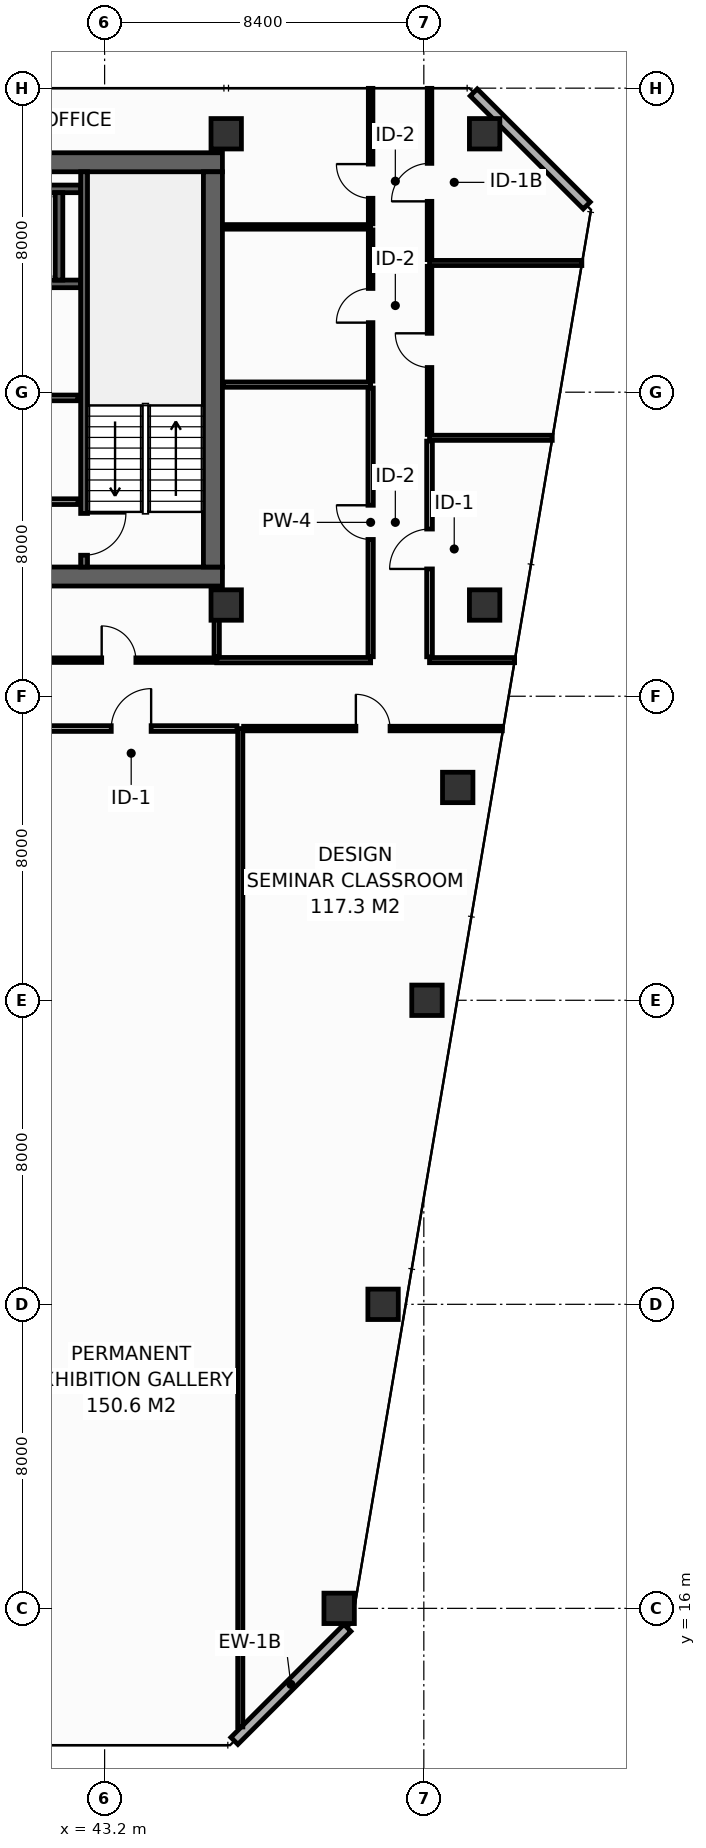
"""IFC4 building model, lengths in metres.
Left out: names, types, materials, properties, quantities, classifications, styles, units other than length and angle.
Written with IfcOpenShell. Run it as: python <this file> out.ifc"""

import sys

from ifc_helpers import new_model, si_unit, direction, frame, frame_2d, origin, origin_2d, place, context, subcontext, project, spatial, rectangle, hollow_rectangle, extrude, element, fill, save


model = new_model("IFC4")
c1 = context("Model", 3, precision=1e-05, world=origin(), true_north=direction((0.0, 1.0)))
c2 = subcontext(c1, "Body", "Model", "MODEL_VIEW")
j1 = project(units=[si_unit("LENGTHUNIT", "METRE"), si_unit("PLANEANGLEUNIT", "RADIAN")], contexts=[c1])
p1 = place(None, origin())
s1 = spatial("IfcSite", under=j1, at=p1, CompositionType="ELEMENT")
p2 = place(p1, origin())
s2 = spatial("IfcBuilding", under=s1, at=p2, CompositionType="ELEMENT")
p3 = place(p2, frame((0.0, 0.0, 186.6)))
s3 = spatial("IfcBuildingStorey", under=s2, at=p3, CompositionType="ELEMENT", Elevation=186.6)
p4 = place(p3, frame((13.6, 43.15, 0.0), z_axis=(0.0, 0.0, 1.0), x_axis=(1.0, 0.0, 0.0)))
e1 = element("IfcWall", 1, at=p4, inside=s3, PredefinedType="SHEAR", context=c2, shape_type="SweptSolid", body=[
    extrude(rectangle(XDim=32.7, YDim=0.5, at=frame_2d((16.35, 0.0))), origin(), (0.0, 0.0, 1.0), 3.55),
])
p5 = place(p4, frame((5.4, 0.0, 0.0)))
e2 = element("IfcOpeningElement", 2, at=p5, cuts=e1, PredefinedType="OPENING", context=c2, shape_type="SweptSolid", body=[
    extrude(rectangle(XDim=1.1, YDim=2.15, at=frame_2d((0.55, 1.075))), frame((0.0, 0.26, 0.0), z_axis=(0.0, -1.0, 0.0), x_axis=(1.0, 0.0, 0.0)), (0.0, 0.0, 1.0), 0.52),
])
p6 = place(p4, frame((25.6, 0.0, 0.0)))
e3 = element("IfcOpeningElement", 3, at=p6, cuts=e1, PredefinedType="OPENING", context=c2, shape_type="SweptSolid", body=[
    extrude(rectangle(XDim=1.1, YDim=2.15, at=frame_2d((0.55, 1.075))), frame((0.0, 0.26, 0.0), z_axis=(0.0, -1.0, 0.0), x_axis=(1.0, 0.0, 0.0)), (0.0, 0.0, 1.0), 0.52),
])
p7 = place(p3, frame((13.6, 54.05, 0.0), z_axis=(0.0, 0.0, 1.0), x_axis=(1.0, 0.0, 0.0)))
e4 = element("IfcWall", 4, at=p7, inside=s3, PredefinedType="SHEAR", context=c2, shape_type="SweptSolid", body=[
    extrude(rectangle(XDim=32.7, YDim=0.5, at=frame_2d((16.35, 0.0))), origin(), (0.0, 0.0, 1.0), 3.55),
])
p8 = place(p3, frame((46.05, 43.4, 0.0), z_axis=(0.0, 0.0, 1.0), x_axis=(0.0, 1.0, 0.0)))
e5 = element("IfcWall", 5, at=p8, inside=s3, PredefinedType="SHEAR", context=c2, shape_type="SweptSolid", body=[
    extrude(rectangle(XDim=10.4, YDim=0.5, at=frame_2d((5.2, 0.0))), origin(), (0.0, 0.0, 1.0), 3.55),
])
for number, where, z_axis, x_axis in (
    (6, (46.4, 54.8, 0.0), (0.0, 0.0, 1.0), (1.0, 0.0, 0.0)),
    (7, (53.2, 54.8, 0.0), (0.0, 0.0, 1.0), (1.0, 0.0, 0.0)),
    (8, (46.4, 42.4, 0.0), (0.0, 0.0, 1.0), (1.0, 0.0, 0.0)),
    (9, (53.2, 42.4, 0.0), (0.0, 0.0, 1.0), (1.0, 0.0, 0.0)),
    (10, (49.372, 16.0, 0.0), (0.0, 0.0, 1.0), (1.0, 0.0, 0.0)),
    (11, (50.528, 24.0, 0.0), (0.0, 0.0, 1.0), (1.0, 0.0, 0.0)),
    (12, (51.683, 32.0, 0.0), (0.0, 0.0, 1.0), (1.0, 0.0, 0.0)),
    (13, (52.492, 37.6, 0.0), (0.0, 0.0, 1.0), (1.0, 0.0, 0.0)),
):
    element("IfcColumn", number, at=place(p3, frame(where, z_axis=z_axis, x_axis=x_axis)), inside=s3, PredefinedType="COLUMN", context=c2, shape_type="SweptSolid", body=[
        extrude(hollow_rectangle(XDim=0.8, YDim=0.8, WallThickness=0.036, at=origin_2d()), origin(), (0.0, 0.0, 1.0), 3.8),
    ])
for number, where, z_axis, x_axis in (
    (14, (39.525, 50.85, 0.0), (0.0, 0.0, 1.0), (1.0, 0.0, 0.0)),
    (15, (39.525, 53.35, 0.0), (0.0, 0.0, 1.0), (1.0, 0.0, 0.0)),
):
    element("IfcWall", number, at=place(p3, frame(where, z_axis=z_axis, x_axis=x_axis)), inside=s3, PredefinedType="SHEAR", context=c2, shape_type="SweptSolid", body=[
        extrude(rectangle(XDim=3.045, YDim=0.2, at=frame_2d((1.522, 0.0))), origin(), (0.0, 0.0, 1.0), 3.55),
    ])
p9 = place(p3, frame((42.0, 50.95, 0.0), z_axis=(0.0, 0.0, 1.0), x_axis=(0.0, 1.0, 0.0)))
e16 = element("IfcWall", 16, at=p9, inside=s3, PredefinedType="SHEAR", context=c2, shape_type="SweptSolid", body=[
    extrude(rectangle(XDim=2.3, YDim=0.2, at=frame_2d((1.15, 0.0))), origin(), (0.0, 0.0, 1.0), 3.55),
])
p10 = place(p3, frame((42.66, 53.8, 0.0), z_axis=(0.0, 0.0, 1.0), x_axis=(0.0, -1.0, 0.0)))
e17 = element("IfcWall", 17, at=p10, inside=s3, PredefinedType="SHEAR", context=c2, shape_type="SweptSolid", body=[
    extrude(rectangle(XDim=10.4, YDim=0.18, at=frame_2d((5.2, 0.0))), origin(), (0.0, 0.0, 1.0), 3.55),
])
p11 = place(p10, frame((8.99, 0.0, 0.0)))
e18 = element("IfcOpeningElement", 18, at=p11, cuts=e17, PredefinedType="OPENING", context=c2, shape_type="SweptSolid", body=[
    extrude(rectangle(XDim=1.1, YDim=2.15, at=frame_2d((0.55, 1.075))), frame((0.0, 0.1, 0.0), z_axis=(0.0, -1.0, 0.0), x_axis=(1.0, 0.0, 0.0)), (0.0, 0.0, 1.0), 0.2),
])
p12 = place(p3, frame((34.05, 45.12, 0.0), z_axis=(0.0, 0.0, 1.0), x_axis=(1.0, 0.0, 0.0)))
e19 = element("IfcWall", 19, at=p12, inside=s3, PredefinedType="PARTITIONING", context=c2, shape_type="SweptSolid", body=[
    extrude(rectangle(XDim=8.45, YDim=0.15, at=frame_2d((4.225, 0.0))), origin(), (0.0, 0.0, 1.0), 3.55),
])
p13 = place(p12, frame((1.5, 0.0, 0.0)))
e20 = element("IfcOpeningElement", 20, at=p13, cuts=e19, PredefinedType="OPENING", context=c2, shape_type="SweptSolid", body=[
    extrude(rectangle(XDim=0.95, YDim=2.15, at=frame_2d((0.475, 1.075))), frame((0.0, 0.085, 0.0), z_axis=(0.0, -1.0, 0.0), x_axis=(1.0, 0.0, 0.0)), (0.0, 0.0, 1.0), 0.17),
])
p14 = place(p12, frame((5.8, 0.0, 0.0)))
e21 = element("IfcOpeningElement", 21, at=p14, cuts=e19, PredefinedType="OPENING", context=c2, shape_type="SweptSolid", body=[
    extrude(rectangle(XDim=0.95, YDim=2.15, at=frame_2d((0.475, 1.075))), frame((0.0, 0.085, 0.0), z_axis=(0.0, -1.0, 0.0), x_axis=(1.0, 0.0, 0.0)), (0.0, 0.0, 1.0), 0.17),
])
p15 = place(p3, frame((34.05, 47.85, 0.0), z_axis=(0.0, 0.0, 1.0), x_axis=(1.0, 0.0, 0.0)))
e22 = element("IfcWall", 22, at=p15, inside=s3, PredefinedType="PARTITIONING", context=c2, shape_type="SweptSolid", body=[
    extrude(rectangle(XDim=8.45, YDim=0.15, at=frame_2d((4.225, 0.0))), origin(), (0.0, 0.0, 1.0), 3.55),
])
p16 = place(p3, frame((46.615, 12.513, 0.0), z_axis=(0.0, 0.0, 1.0), x_axis=(0.707135806771, 0.70707775441, 0.0)))
e23 = element("IfcWall", 23, at=p16, inside=s3, PredefinedType="STANDARD", context=c2, shape_type="SweptSolid", body=[
    extrude(rectangle(XDim=4.206, YDim=0.26, at=frame_2d((2.103, 0.0))), origin(), (0.0, 0.0, 1.0), 3.55),
])
p17 = place(p3, frame((55.887, 52.913, 0.0), z_axis=(0.0, 0.0, 1.0), x_axis=(-0.707106781187, 0.707106781187, 0.0)))
e24 = element("IfcWall", 24, at=p17, inside=s3, PredefinedType="STANDARD", context=c2, shape_type="SweptSolid", body=[
    extrude(rectangle(XDim=4.206, YDim=0.26, at=frame_2d((2.103, 0.0))), origin(), (0.0, 0.0, 1.0), 3.55),
])
p18 = place(p3, frame((46.15, 40.95, 0.0), z_axis=(0.0, 0.0, 1.0), x_axis=(1.0, 0.0, 0.0)))
e25 = element("IfcWall", 25, at=p18, inside=s3, PredefinedType="PARTITIONING", context=c2, shape_type="SweptSolid", body=[
    extrude(rectangle(XDim=4.05, YDim=0.14, at=frame_2d((2.025, 0.0))), origin(), (0.0, 0.0, 1.0), 3.55),
])
p19 = place(p3, frame((46.15, 41.04, 0.0), z_axis=(0.0, 0.0, 1.0), x_axis=(0.0, 1.0, 0.0)))
e26 = element("IfcWall", 26, at=p19, inside=s3, PredefinedType="PARTITIONING", context=c2, shape_type="SweptSolid", body=[
    extrude(rectangle(XDim=1.84, YDim=0.14, at=frame_2d((0.92, 0.0))), origin(), (0.0, 0.0, 1.0), 3.55),
])
p20 = place(p3, frame((46.32, 48.2, 0.0), z_axis=(0.0, 0.0, 1.0), x_axis=(1.0, 0.0, 0.0)))
e27 = element("IfcWall", 27, at=p20, inside=s3, PredefinedType="PARTITIONING", context=c2, shape_type="SweptSolid", body=[
    extrude(rectangle(XDim=3.88, YDim=0.14, at=frame_2d((1.94, 0.0))), origin(), (0.0, 0.0, 1.0), 3.55),
])
p21 = place(p3, frame((50.2, 41.04, 0.0), z_axis=(0.0, 0.0, 1.0), x_axis=(0.0, 1.0, 0.0)))
e28 = element("IfcWall", 28, at=p21, inside=s3, PredefinedType="PARTITIONING", context=c2, shape_type="SweptSolid", body=[
    extrude(rectangle(XDim=7.07, YDim=0.14, at=frame_2d((3.535, 0.0))), origin(), (0.0, 0.0, 1.0), 2.835),
])
p22 = place(p21, frame((3.085, 0.0, 0.0)))
e29 = element("IfcOpeningElement", 29, at=p22, cuts=e28, PredefinedType="OPENING", context=c2, shape_type="SweptSolid", body=[
    extrude(rectangle(XDim=0.9, YDim=2.1, at=frame_2d((0.45, 1.05))), frame((0.0, 0.08, 0.0), z_axis=(0.0, -1.0, 0.0), x_axis=(1.0, 0.0, 0.0)), (0.0, 0.0, 1.0), 0.16),
])
p23 = place(p3, frame((46.32, 52.35, 0.0), z_axis=(0.0, 0.0, 1.0), x_axis=(1.0, 0.0, 0.0)))
e30 = element("IfcWall", 30, at=p23, inside=s3, PredefinedType="PARTITIONING", context=c2, shape_type="SweptSolid", body=[
    extrude(rectangle(XDim=3.88, YDim=0.12, at=frame_2d((1.94, 0.0))), origin(), (0.0, 0.0, 1.0), 3.55),
])
p24 = place(p3, frame((50.2, 48.29, 0.0), z_axis=(0.0, 0.0, 1.0), x_axis=(0.0, 1.0, 0.0)))
e31 = element("IfcWall", 31, at=p24, inside=s3, PredefinedType="PARTITIONING", context=c2, shape_type="SweptSolid", body=[
    extrude(rectangle(XDim=3.98, YDim=0.12, at=frame_2d((1.99, 0.0))), origin(), (0.0, 0.0, 1.0), 3.55),
])
p25 = place(p24, frame((1.54, 0.0, 0.0)))
e32 = element("IfcOpeningElement", 32, at=p25, cuts=e31, PredefinedType="OPENING", context=c2, shape_type="SweptSolid", body=[
    extrude(rectangle(XDim=0.9, YDim=2.1, at=frame_2d((0.45, 1.05))), frame((0.0, 0.07, 0.0), z_axis=(0.0, -1.0, 0.0), x_axis=(1.0, 0.0, 0.0)), (0.0, 0.0, 1.0), 0.14),
])
p26 = place(p3, frame((50.2, 52.43, 0.0), z_axis=(0.0, 0.0, 1.0), x_axis=(0.0, 1.0, 0.0)))
e33 = element("IfcWall", 33, at=p26, inside=s3, PredefinedType="PARTITIONING", context=c2, shape_type="SweptSolid", body=[
    extrude(rectangle(XDim=3.565, YDim=0.12, at=frame_2d((1.783, 0.0))), origin(), (0.0, 0.0, 1.0), 2.935),
])
p27 = place(p26, frame((0.672, 0.0, 0.0)))
e34 = element("IfcOpeningElement", 34, at=p27, cuts=e33, PredefinedType="OPENING", context=c2, shape_type="SweptSolid", body=[
    extrude(rectangle(XDim=0.9, YDim=2.1, at=frame_2d((0.45, 1.05))), frame((0.0, 0.07, 0.0), z_axis=(0.0, -1.0, 0.0), x_axis=(1.0, 0.0, 0.0)), (0.0, 0.0, 1.0), 0.14),
])
p28 = place(p3, frame((51.75, 40.95, 0.0), z_axis=(0.0, 0.0, 1.0), x_axis=(1.0, 0.0, 0.0)))
e35 = element("IfcWall", 35, at=p28, inside=s3, PredefinedType="PARTITIONING", context=c2, shape_type="SweptSolid", body=[
    extrude(rectangle(XDim=2.239, YDim=0.135, at=frame_2d((1.119, 0.0))), origin(), (0.0, 0.0, 1.0), 3.035),
])
p29 = place(p3, frame((51.75, 46.8, 0.0), z_axis=(0.0, 0.0, 1.0), x_axis=(1.0, 0.0, 0.0)))
e36 = element("IfcWall", 36, at=p29, inside=s3, PredefinedType="PARTITIONING", context=c2, shape_type="SweptSolid", body=[
    extrude(rectangle(XDim=3.229, YDim=0.135, at=frame_2d((1.615, 0.0))), origin(), (0.0, 0.0, 1.0), 2.835),
])
p30 = place(p3, frame((51.75, 51.4, 0.0), z_axis=(0.0, 0.0, 1.0), x_axis=(1.0, 0.0, 0.0)))
e37 = element("IfcWall", 37, at=p30, inside=s3, PredefinedType="PARTITIONING", context=c2, shape_type="SweptSolid", body=[
    extrude(rectangle(XDim=4.008, YDim=0.135, at=frame_2d((2.004, 0.0))), origin(), (0.0, 0.0, 1.0), 2.835),
])
p31 = place(p3, frame((51.75, 41.038, 0.0), z_axis=(0.0, 0.0, 1.0), x_axis=(0.0, 1.0, 0.0)))
e38 = element("IfcWall", 38, at=p31, inside=s3, PredefinedType="PARTITIONING", context=c2, shape_type="SweptSolid", body=[
    extrude(rectangle(XDim=5.675, YDim=0.15, at=frame_2d((2.837, 0.0))), origin(), (0.0, 0.0, 1.0), 2.835),
])
p32 = place(p31, frame((2.312, 0.0, 0.0)))
e39 = element("IfcOpeningElement", 39, at=p32, cuts=e38, PredefinedType="OPENING", context=c2, shape_type="SweptSolid", body=[
    extrude(rectangle(XDim=1.05, YDim=2.15, at=frame_2d((0.525, 1.075))), frame((0.0, 0.085, 0.0), z_axis=(0.0, -1.0, 0.0), x_axis=(1.0, 0.0, 0.0)), (0.0, 0.0, 1.0), 0.17),
])
p33 = place(p3, frame((51.75, 46.887, 0.0), z_axis=(0.0, 0.0, 1.0), x_axis=(0.0, 1.0, 0.0)))
e40 = element("IfcWall", 40, at=p33, inside=s3, PredefinedType="PARTITIONING", context=c2, shape_type="SweptSolid", body=[
    extrude(rectangle(XDim=4.425, YDim=0.12, at=frame_2d((2.212, 0.0))), origin(), (0.0, 0.0, 1.0), 3.55),
])
p34 = place(p33, frame((1.762, 0.0, 0.0)))
e41 = element("IfcOpeningElement", 41, at=p34, cuts=e40, PredefinedType="OPENING", context=c2, shape_type="SweptSolid", body=[
    extrude(rectangle(XDim=0.9, YDim=2.1, at=frame_2d((0.45, 1.05))), frame((0.0, 0.07, 0.0), z_axis=(0.0, -1.0, 0.0), x_axis=(1.0, 0.0, 0.0)), (0.0, 0.0, 1.0), 0.14),
])
p35 = place(p3, frame((51.75, 51.488, 0.0), z_axis=(0.0, 0.0, 1.0), x_axis=(0.0, 1.0, 0.0)))
e42 = element("IfcWall", 42, at=p35, inside=s3, PredefinedType="PARTITIONING", context=c2, shape_type="SweptSolid", body=[
    extrude(rectangle(XDim=4.508, YDim=0.12, at=frame_2d((2.254, 0.0))), origin(), (0.0, 0.0, 1.0), 2.935),
])
p36 = place(p35, frame((1.534, 0.0, 0.0)))
e43 = element("IfcOpeningElement", 43, at=p36, cuts=e42, PredefinedType="OPENING", context=c2, shape_type="SweptSolid", body=[
    extrude(rectangle(XDim=1.0, YDim=2.15, at=frame_2d((0.5, 1.075))), frame((0.0, 0.07, 0.0), z_axis=(0.0, -1.0, 0.0), x_axis=(1.0, 0.0, 0.0)), (0.0, 0.0, 1.0), 0.14),
])
p37 = place(p3, frame((40.995, 40.95, 0.0), z_axis=(0.0, 0.0, 1.0), x_axis=(1.0, 0.0, 0.0)))
e44 = element("IfcWall", 44, at=p37, inside=s3, PredefinedType="PARTITIONING", context=c2, shape_type="SweptSolid", body=[
    extrude(rectangle(XDim=5.155, YDim=0.12, at=frame_2d((2.577, 0.0))), origin(), (0.0, 0.0, 1.0), 3.55),
])
p38 = place(p37, frame((2.128, 0.0, 0.0)))
e45 = element("IfcOpeningElement", 45, at=p38, cuts=e44, PredefinedType="OPENING", context=c2, shape_type="SweptSolid", body=[
    extrude(rectangle(XDim=0.9, YDim=2.1, at=frame_2d((0.45, 1.05))), frame((0.0, 0.07, 0.0), z_axis=(0.0, -1.0, 0.0), x_axis=(1.0, 0.0, 0.0)), (0.0, 0.0, 1.0), 0.14),
])
p39 = place(p3, frame((46.77, 12.88, 0.0), z_axis=(0.0, 0.0, 1.0), x_axis=(0.0, 1.0, 0.0)))
e46 = element("IfcWall", 46, at=p39, inside=s3, PredefinedType="PARTITIONING", context=c2, shape_type="SweptSolid", body=[
    extrude(rectangle(XDim=26.27, YDim=0.135, at=frame_2d((13.135, 0.0))), origin(), (0.0, 0.0, 1.0), 2.835),
])
p40 = place(p3, frame((41.117, 39.15, 0.0), z_axis=(0.0, 0.0, 1.0), x_axis=(1.0, 0.0, 0.0)))
e47 = element("IfcWall", 47, at=p40, inside=s3, PredefinedType="PARTITIONING", context=c2, shape_type="SweptSolid", body=[
    extrude(rectangle(XDim=5.565, YDim=0.15, at=frame_2d((2.783, 0.0))), origin(), (0.0, 0.0, 1.0), 3.55),
])
p41 = place(p40, frame((2.257, 0.0, 0.0)))
e48 = element("IfcOpeningElement", 48, at=p41, cuts=e47, PredefinedType="OPENING", context=c2, shape_type="SweptSolid", body=[
    extrude(rectangle(XDim=1.05, YDim=2.15, at=frame_2d((0.525, 1.075))), frame((0.0, 0.085, 0.0), z_axis=(0.0, -1.0, 0.0), x_axis=(1.0, 0.0, 0.0)), (0.0, 0.0, 1.0), 0.17),
])
p42 = place(p3, frame((46.857, 39.15, 0.0), z_axis=(0.0, 0.0, 1.0), x_axis=(1.0, 0.0, 0.0)))
e49 = element("IfcWall", 49, at=p42, inside=s3, PredefinedType="PARTITIONING", context=c2, shape_type="SweptSolid", body=[
    extrude(rectangle(XDim=6.809, YDim=0.12, at=frame_2d((3.404, 0.0))), origin(), (0.0, 0.0, 1.0), 3.035),
])
p43 = place(p42, frame((2.954, 0.0, 0.0)))
e50 = element("IfcOpeningElement", 50, at=p43, cuts=e49, PredefinedType="OPENING", context=c2, shape_type="SweptSolid", body=[
    extrude(rectangle(XDim=0.9, YDim=2.1, at=frame_2d((0.45, 1.05))), frame((0.0, 0.07, 0.0), z_axis=(0.0, -1.0, 0.0), x_axis=(1.0, 0.0, 0.0)), (0.0, 0.0, 1.0), 0.14),
])
p44 = place(p11, origin())
e51 = element("IfcDoor", 51, at=p44, inside=s3, OperationType="SINGLE_SWING_LEFT", PredefinedType="DOOR", context=c2, shape_type="SweptSolid", body=[
    extrude(rectangle(XDim=1.1, YDim=2.15, at=frame_2d((0.55, 1.075))), frame((0.0, 0.025, 0.0), z_axis=(0.0, -1.0, 0.0), x_axis=(1.0, 0.0, 0.0)), (0.0, 0.0, 1.0), 0.05),
])
fill(e18, e51)
p45 = place(p22, origin())
e52 = element("IfcDoor", 52, at=p45, inside=s3, OperationType="SINGLE_SWING_RIGHT", PredefinedType="DOOR", context=c2, shape_type="SweptSolid", body=[
    extrude(rectangle(XDim=0.9, YDim=2.1, at=frame_2d((0.45, 1.05))), frame((0.0, 0.025, 0.0), z_axis=(0.0, -1.0, 0.0), x_axis=(1.0, 0.0, 0.0)), (0.0, 0.0, 1.0), 0.05),
])
fill(e29, e52)
p46 = place(p25, origin())
e53 = element("IfcDoor", 53, at=p46, inside=s3, OperationType="SINGLE_SWING_LEFT", PredefinedType="DOOR", context=c2, shape_type="SweptSolid", body=[
    extrude(rectangle(XDim=0.9, YDim=2.1, at=frame_2d((0.45, 1.05))), frame((0.0, 0.025, 0.0), z_axis=(0.0, -1.0, 0.0), x_axis=(1.0, 0.0, 0.0)), (0.0, 0.0, 1.0), 0.05),
])
fill(e32, e53)
p47 = place(p27, origin())
e54 = element("IfcDoor", 54, at=p47, inside=s3, OperationType="SINGLE_SWING_RIGHT", PredefinedType="DOOR", context=c2, shape_type="SweptSolid", body=[
    extrude(rectangle(XDim=0.9, YDim=2.1, at=frame_2d((0.45, 1.05))), frame((0.0, 0.025, 0.0), z_axis=(0.0, -1.0, 0.0), x_axis=(1.0, 0.0, 0.0)), (0.0, 0.0, 1.0), 0.05),
])
fill(e34, e54)
p48 = place(p32, origin())
e55 = element("IfcDoor", 55, at=p48, inside=s3, OperationType="SINGLE_SWING_LEFT", PredefinedType="DOOR", context=c2, shape_type="SweptSolid", body=[
    extrude(rectangle(XDim=1.05, YDim=2.15, at=frame_2d((0.525, 1.075))), frame((0.0, 0.025, 0.0), z_axis=(0.0, -1.0, 0.0), x_axis=(1.0, 0.0, 0.0)), (0.0, 0.0, 1.0), 0.05),
])
fill(e39, e55)
p49 = place(p34, origin())
e56 = element("IfcDoor", 56, at=p49, inside=s3, OperationType="SINGLE_SWING_RIGHT", PredefinedType="DOOR", context=c2, shape_type="SweptSolid", body=[
    extrude(rectangle(XDim=0.9, YDim=2.1, at=frame_2d((0.45, 1.05))), frame((0.0, 0.025, 0.0), z_axis=(0.0, -1.0, 0.0), x_axis=(1.0, 0.0, 0.0)), (0.0, 0.0, 1.0), 0.05),
])
fill(e41, e56)
p50 = place(p36, origin())
e57 = element("IfcDoor", 57, at=p50, inside=s3, OperationType="SINGLE_SWING_LEFT", PredefinedType="DOOR", context=c2, shape_type="SweptSolid", body=[
    extrude(rectangle(XDim=1.0, YDim=2.15, at=frame_2d((0.5, 1.075))), frame((0.0, 0.025, 0.0), z_axis=(0.0, -1.0, 0.0), x_axis=(1.0, 0.0, 0.0)), (0.0, 0.0, 1.0), 0.05),
])
fill(e43, e57)
p51 = place(p38, origin())
e58 = element("IfcDoor", 58, at=p51, inside=s3, OperationType="SINGLE_SWING_LEFT", PredefinedType="DOOR", context=c2, shape_type="SweptSolid", body=[
    extrude(rectangle(XDim=0.9, YDim=2.1, at=frame_2d((0.45, 1.05))), frame((0.0, 0.025, 0.0), z_axis=(0.0, -1.0, 0.0), x_axis=(1.0, 0.0, 0.0)), (0.0, 0.0, 1.0), 0.05),
])
fill(e45, e58)
p52 = place(p41, origin())
e59 = element("IfcDoor", 59, at=p52, inside=s3, OperationType="SINGLE_SWING_RIGHT", PredefinedType="DOOR", context=c2, shape_type="SweptSolid", body=[
    extrude(rectangle(XDim=1.05, YDim=2.15, at=frame_2d((0.525, 1.075))), frame((0.0, 0.025, 0.0), z_axis=(0.0, -1.0, 0.0), x_axis=(1.0, 0.0, 0.0)), (0.0, 0.0, 1.0), 0.05),
])
fill(e48, e59)
p53 = place(p43, origin())
e60 = element("IfcDoor", 60, at=p53, inside=s3, OperationType="SINGLE_SWING_LEFT", PredefinedType="DOOR", context=c2, shape_type="SweptSolid", body=[
    extrude(rectangle(XDim=0.9, YDim=2.1, at=frame_2d((0.45, 1.05))), frame((0.0, 0.025, 0.0), z_axis=(0.0, -1.0, 0.0), x_axis=(1.0, 0.0, 0.0)), (0.0, 0.0, 1.0), 0.05),
])
fill(e50, e60)
save(model, sys.argv[1])
